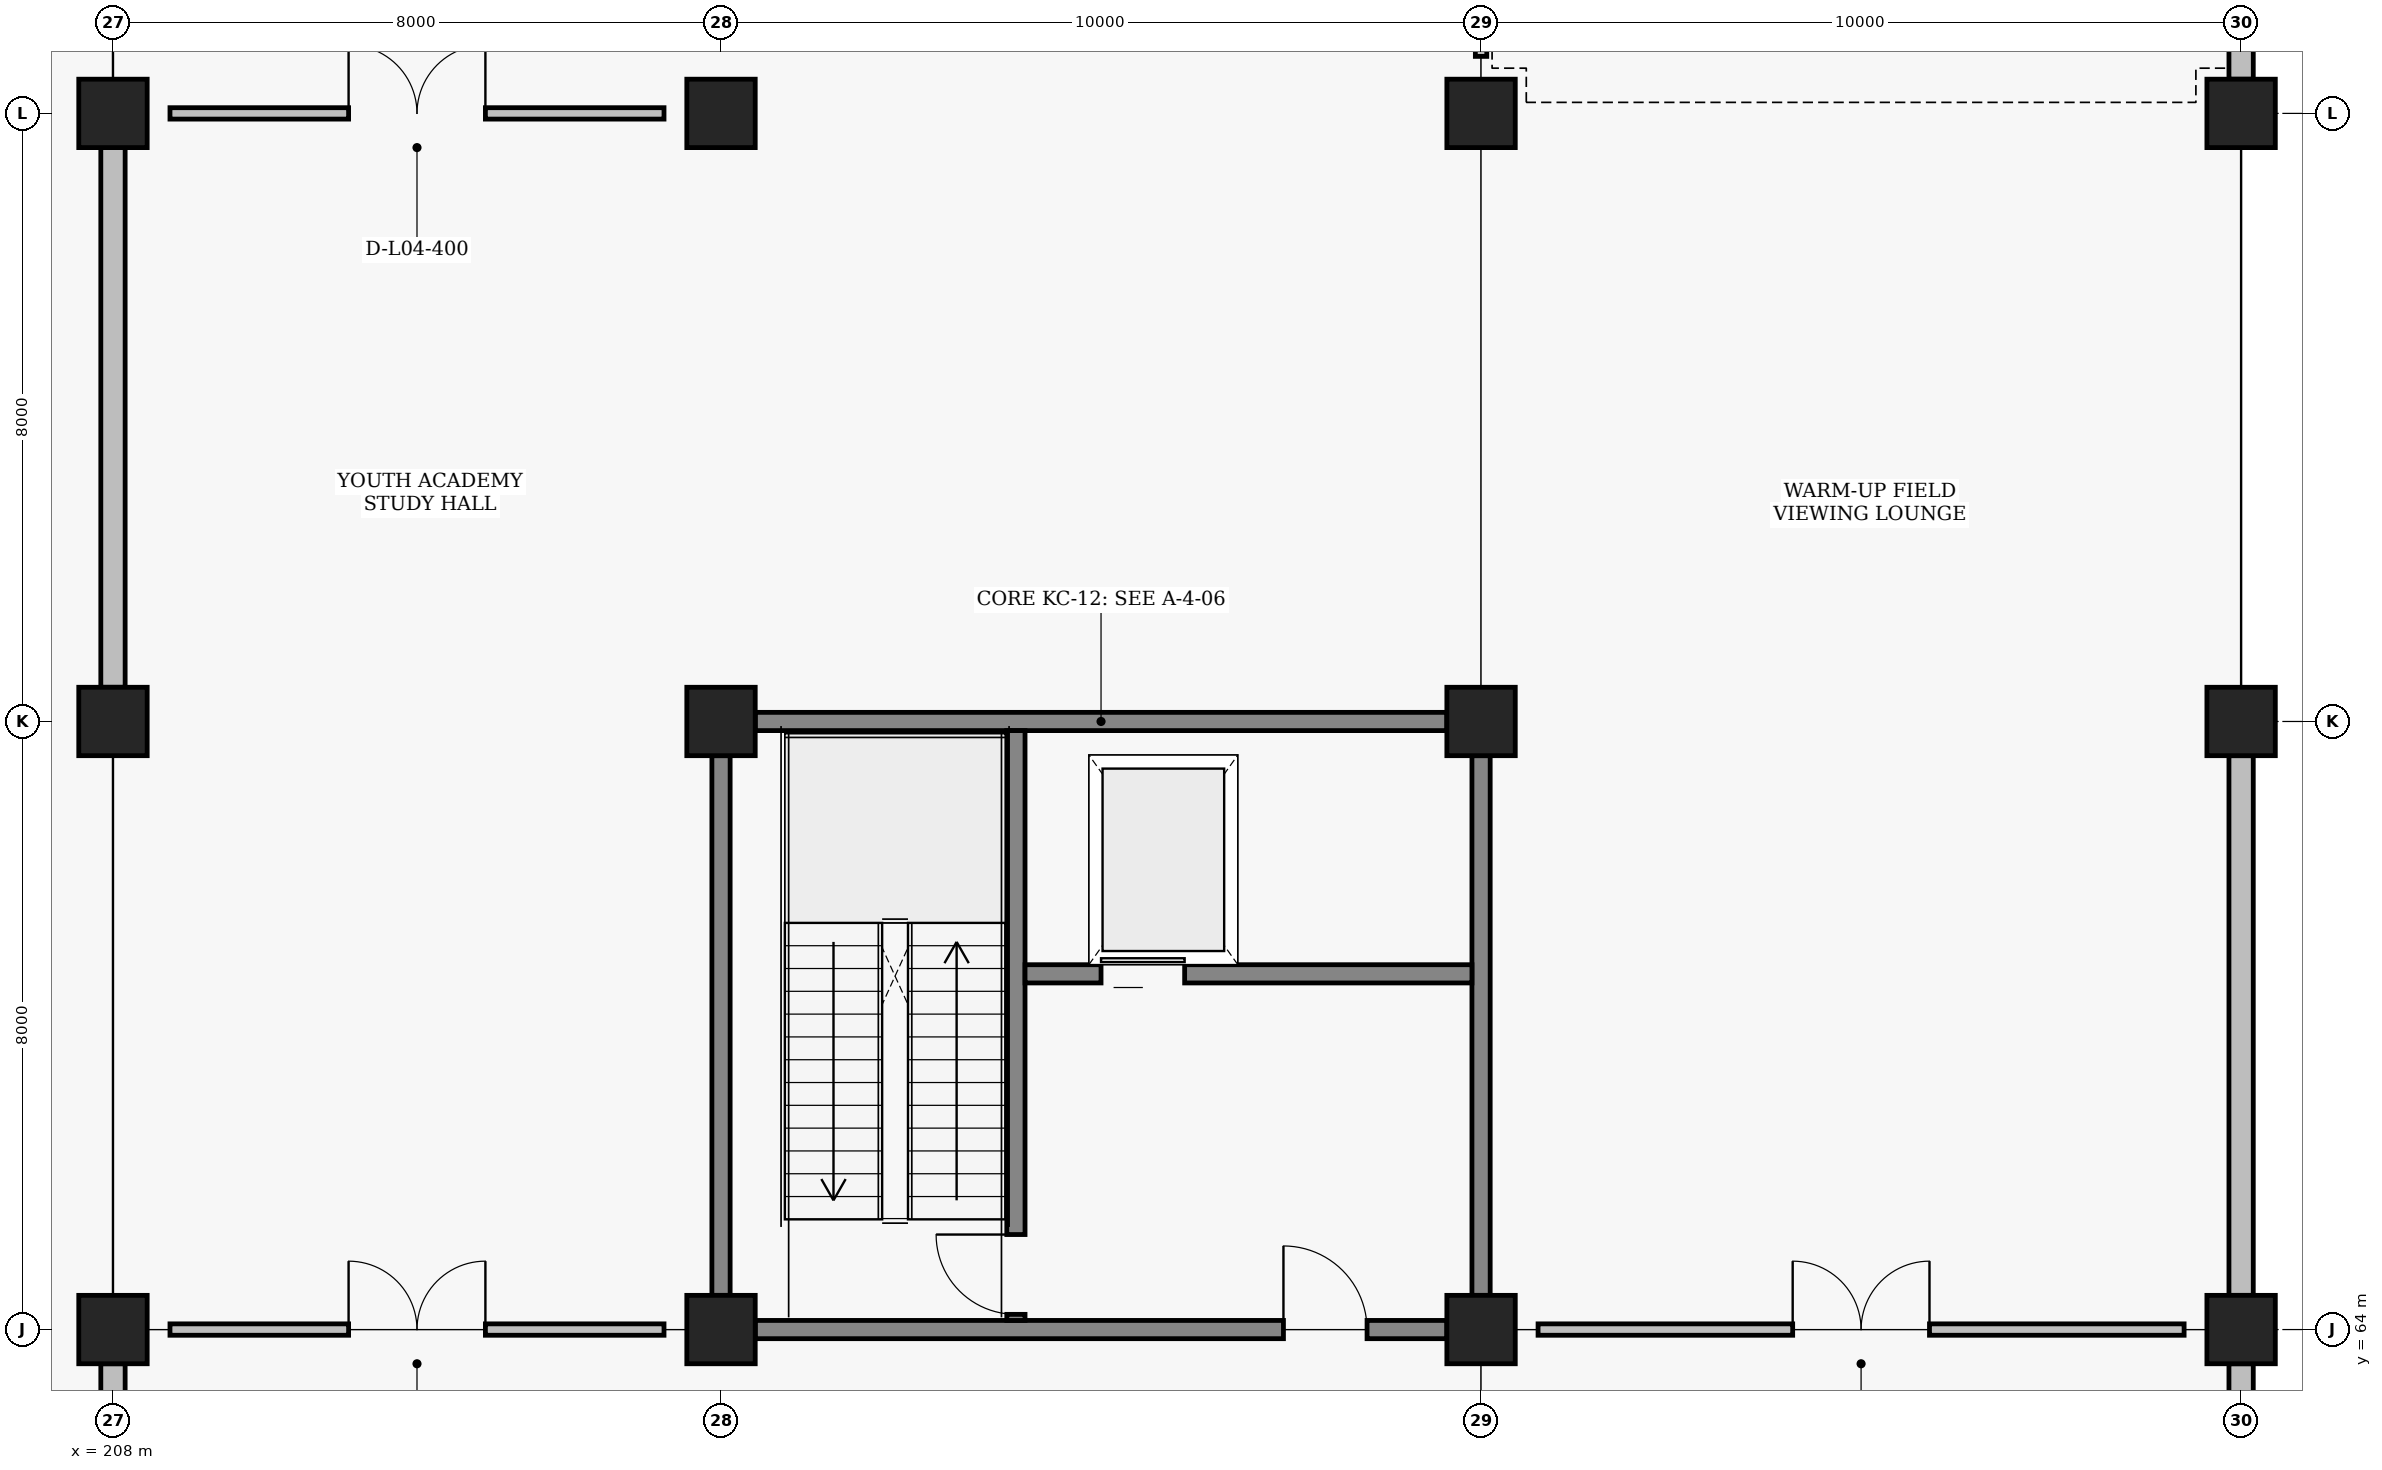
"""IFC4 building model, lengths in metres.
Left out: names, types, materials, properties, quantities, classifications, styles, units other than length and angle.
Written with IfcOpenShell. Run it as: python <this file> out.ifc"""

import sys

from ifc_helpers import new_model, si_unit, direction, frame, frame_2d, origin, origin_2d, place, context, subcontext, project, spatial, rectangle, extrude, element, fill, save


model = new_model("IFC4")
c1 = context("Model", 3, precision=1e-05, world=origin(), true_north=direction((0.0, 1.0)))
c2 = subcontext(c1, "Body", "Model", "MODEL_VIEW")
j1 = project(units=[si_unit("LENGTHUNIT", "METRE"), si_unit("PLANEANGLEUNIT", "RADIAN")], contexts=[c1])
p1 = place(None, origin())
s1 = spatial("IfcSite", under=j1, at=p1, CompositionType="ELEMENT")
p2 = place(p1, origin())
s2 = spatial("IfcBuilding", under=s1, at=p2, CompositionType="ELEMENT")
p3 = place(p2, frame((0.0, 0.0, 14.4)))
s3 = spatial("IfcBuildingStorey", under=s2, at=p3, CompositionType="ELEMENT", Elevation=14.4)
for number, where, z_axis, x_axis in (
    (1, (208.0, 64.0, 0.0), (0.0, 0.0, 1.0), (1.0, 0.0, 0.0)),
    (2, (208.0, 72.0, 0.0), (0.0, 0.0, 1.0), (1.0, 0.0, 0.0)),
    (3, (208.0, 80.0, 0.0), (0.0, 0.0, 1.0), (1.0, 0.0, 0.0)),
    (4, (216.0, 64.0, 0.0), (0.0, 0.0, 1.0), (1.0, 0.0, 0.0)),
    (5, (216.0, 72.0, 0.0), (0.0, 0.0, 1.0), (1.0, 0.0, 0.0)),
    (6, (216.0, 80.0, 0.0), (0.0, 0.0, 1.0), (1.0, 0.0, 0.0)),
    (7, (226.0, 64.0, 0.0), (0.0, 0.0, 1.0), (1.0, 0.0, 0.0)),
    (8, (226.0, 72.0, 0.0), (0.0, 0.0, 1.0), (1.0, 0.0, 0.0)),
    (9, (226.0, 80.0, 0.0), (0.0, 0.0, 1.0), (1.0, 0.0, 0.0)),
    (10, (236.0, 64.0, 0.0), (0.0, 0.0, 1.0), (1.0, 0.0, 0.0)),
    (11, (236.0, 72.0, 0.0), (0.0, 0.0, 1.0), (1.0, 0.0, 0.0)),
    (12, (236.0, 80.0, 0.0), (0.0, 0.0, 1.0), (1.0, 0.0, 0.0)),
):
    element("IfcColumn", number, at=place(p3, frame(where, z_axis=z_axis, x_axis=x_axis)), inside=s3, PredefinedType="COLUMN", context=c2, shape_type="SweptSolid", body=[
        extrude(rectangle(XDim=0.9, YDim=0.9, at=origin_2d()), origin(), (0.0, 0.0, 1.0), 4.2),
    ])
for number, where, z_axis, x_axis in (
    (13, (208.0, 56.45, 0.0), (0.0, 0.0, 1.0), (0.0, 1.0, 0.0)),
    (14, (208.0, 72.45, 0.0), (0.0, 0.0, 1.0), (0.0, 1.0, 0.0)),
):
    element("IfcWall", number, at=place(p3, frame(where, z_axis=z_axis, x_axis=x_axis)), inside=s3, PredefinedType="SOLIDWALL", context=c2, shape_type="SweptSolid", body=[
        extrude(rectangle(XDim=7.1, YDim=0.32, at=frame_2d((3.55, 0.0))), origin(), (0.0, 0.0, 1.0), 3.33),
    ])
for number, where, z_axis, x_axis in (
    (15, (236.0, 56.45, 0.0), (0.0, 0.0, 1.0), (0.0, 1.0, 0.0)),
    (16, (236.0, 64.45, 0.0), (0.0, 0.0, 1.0), (0.0, 1.0, 0.0)),
    (17, (236.0, 80.45, 0.0), (0.0, 0.0, 1.0), (0.0, 1.0, 0.0)),
):
    element("IfcWall", number, at=place(p3, frame(where, z_axis=z_axis, x_axis=x_axis)), inside=s3, PredefinedType="SOLIDWALL", context=c2, shape_type="SweptSolid", body=[
        extrude(rectangle(XDim=7.1, YDim=0.32, at=frame_2d((3.55, 0.0))), origin(), (0.0, 0.0, 1.0), 3.23),
    ])
p4 = place(p3, frame((216.45, 64.0, 0.0), z_axis=(0.0, 0.0, 1.0), x_axis=(1.0, 0.0, 0.0)))
e18 = element("IfcWall", 18, at=p4, inside=s3, PredefinedType="SHEAR", context=c2, shape_type="SweptSolid", body=[
    extrude(rectangle(XDim=9.1, YDim=0.24, at=frame_2d((4.55, 0.0))), origin(), (0.0, 0.0, 1.0), 3.23),
])
p5 = place(p4, frame((6.95, 0.0, 0.0)))
e19 = element("IfcOpeningElement", 19, at=p5, cuts=e18, PredefinedType="OPENING", context=c2, shape_type="SweptSolid", body=[
    extrude(rectangle(XDim=1.1, YDim=2.2, at=frame_2d((0.55, 1.1))), frame((0.0, 0.13, 0.0), z_axis=(0.0, -1.0, 0.0), x_axis=(1.0, 0.0, 0.0)), (0.0, 0.0, 1.0), 0.26),
])
p6 = place(p3, frame((216.45, 72.0, 0.0), z_axis=(0.0, 0.0, 1.0), x_axis=(1.0, 0.0, 0.0)))
e20 = element("IfcWall", 20, at=p6, inside=s3, PredefinedType="SHEAR", context=c2, shape_type="SweptSolid", body=[
    extrude(rectangle(XDim=9.1, YDim=0.24, at=frame_2d((4.55, 0.0))), origin(), (0.0, 0.0, 1.0), 3.23),
])
p7 = place(p3, frame((216.0, 64.45, 0.0), z_axis=(0.0, 0.0, 1.0), x_axis=(0.0, 1.0, 0.0)))
e21 = element("IfcWall", 21, at=p7, inside=s3, PredefinedType="SHEAR", context=c2, shape_type="SweptSolid", body=[
    extrude(rectangle(XDim=7.1, YDim=0.24, at=frame_2d((3.55, 0.0))), origin(), (0.0, 0.0, 1.0), 3.33),
])
p8 = place(p3, frame((226.0, 64.45, 0.0), z_axis=(0.0, 0.0, 1.0), x_axis=(0.0, 1.0, 0.0)))
e22 = element("IfcWall", 22, at=p8, inside=s3, PredefinedType="SHEAR", context=c2, shape_type="SweptSolid", body=[
    extrude(rectangle(XDim=7.1, YDim=0.24, at=frame_2d((3.55, 0.0))), origin(), (0.0, 0.0, 1.0), 3.23),
])
p9 = place(p3, frame((219.88, 64.12, 0.0), z_axis=(0.0, 0.0, 1.0), x_axis=(0.0, 1.0, 0.0)))
e23 = element("IfcWall", 23, at=p9, inside=s3, PredefinedType="SHEAR", context=c2, shape_type="SweptSolid", body=[
    extrude(rectangle(XDim=7.76, YDim=0.24, at=frame_2d((3.88, 0.0))), origin(), (0.0, 0.0, 1.0), 3.43),
])
p10 = place(p9, frame((0.08, 0.0, 0.0)))
e24 = element("IfcOpeningElement", 24, at=p10, cuts=e23, PredefinedType="OPENING", context=c2, shape_type="SweptSolid", body=[
    extrude(rectangle(XDim=1.05, YDim=2.15, at=frame_2d((0.525, 1.075))), frame((0.0, 0.13, 0.0), z_axis=(0.0, -1.0, 0.0), x_axis=(1.0, 0.0, 0.0)), (0.0, 0.0, 1.0), 0.26),
])
p11 = place(p3, frame((220.0, 68.68, 0.0), z_axis=(0.0, 0.0, 1.0), x_axis=(1.0, 0.0, 0.0)))
e25 = element("IfcWall", 25, at=p11, inside=s3, PredefinedType="SHEAR", context=c2, shape_type="SweptSolid", body=[
    extrude(rectangle(XDim=5.88, YDim=0.24, at=frame_2d((2.94, 0.0))), origin(), (0.0, 0.0, 1.0), 3.33),
])
p12 = place(p11, frame((1.0, 0.0, 0.0)))
e26 = element("IfcOpeningElement", 26, at=p12, cuts=e25, PredefinedType="OPENING", context=c2, shape_type="SweptSolid", body=[
    extrude(rectangle(XDim=1.1, YDim=2.15, at=frame_2d((0.55, 1.075))), frame((0.0, 0.13, 0.0), z_axis=(0.0, -1.0, 0.0), x_axis=(1.0, 0.0, 0.0)), (0.0, 0.0, 1.0), 0.26),
])
p13 = place(p3, frame((208.75, 64.0, 0.0), z_axis=(0.0, 0.0, 1.0), x_axis=(1.0, 0.0, 0.0)))
e27 = element("IfcWall", 27, at=p13, inside=s3, PredefinedType="PARTITIONING", context=c2, shape_type="SweptSolid", body=[
    extrude(rectangle(XDim=6.5, YDim=0.15, at=frame_2d((3.25, 0.0))), origin(), (0.0, 0.0, 1.0), 3.43),
])
p14 = place(p13, frame((2.35, 0.0, 0.0)))
e28 = element("IfcOpeningElement", 28, at=p14, cuts=e27, PredefinedType="OPENING", context=c2, shape_type="SweptSolid", body=[
    extrude(rectangle(XDim=1.8, YDim=2.3, at=frame_2d((0.9, 1.15))), frame((0.0, 0.085, 0.0), z_axis=(0.0, -1.0, 0.0), x_axis=(1.0, 0.0, 0.0)), (0.0, 0.0, 1.0), 0.17),
])
p15 = place(p3, frame((208.75, 80.0, 0.0), z_axis=(0.0, 0.0, 1.0), x_axis=(1.0, 0.0, 0.0)))
e29 = element("IfcWall", 29, at=p15, inside=s3, PredefinedType="PARTITIONING", context=c2, shape_type="SweptSolid", body=[
    extrude(rectangle(XDim=6.5, YDim=0.15, at=frame_2d((3.25, 0.0))), origin(), (0.0, 0.0, 1.0), 3.43),
])
p16 = place(p15, frame((2.35, 0.0, 0.0)))
e30 = element("IfcOpeningElement", 30, at=p16, cuts=e29, PredefinedType="OPENING", context=c2, shape_type="SweptSolid", body=[
    extrude(rectangle(XDim=1.8, YDim=2.3, at=frame_2d((0.9, 1.15))), frame((0.0, 0.085, 0.0), z_axis=(0.0, -1.0, 0.0), x_axis=(1.0, 0.0, 0.0)), (0.0, 0.0, 1.0), 0.17),
])
p17 = place(p3, frame((226.75, 64.0, 0.0), z_axis=(0.0, 0.0, 1.0), x_axis=(1.0, 0.0, 0.0)))
e31 = element("IfcWall", 31, at=p17, inside=s3, PredefinedType="PARTITIONING", context=c2, shape_type="SweptSolid", body=[
    extrude(rectangle(XDim=8.5, YDim=0.15, at=frame_2d((4.25, 0.0))), origin(), (0.0, 0.0, 1.0), 3.23),
])
p18 = place(p17, frame((3.35, 0.0, 0.0)))
e32 = element("IfcOpeningElement", 32, at=p18, cuts=e31, PredefinedType="OPENING", context=c2, shape_type="SweptSolid", body=[
    extrude(rectangle(XDim=1.8, YDim=2.3, at=frame_2d((0.9, 1.15))), frame((0.0, 0.085, 0.0), z_axis=(0.0, -1.0, 0.0), x_axis=(1.0, 0.0, 0.0)), (0.0, 0.0, 1.0), 0.17),
])
p19 = place(p3, frame((226.0, 80.75, 0.0), z_axis=(0.0, 0.0, 1.0), x_axis=(0.0, 1.0, 0.0)))
e33 = element("IfcWall", 33, at=p19, inside=s3, PredefinedType="PARTITIONING", context=c2, shape_type="SweptSolid", body=[
    extrude(rectangle(XDim=6.5, YDim=0.15, at=frame_2d((3.25, 0.0))), origin(), (0.0, 0.0, 1.0), 3.33),
])
p20 = place(p19, frame((2.725, 0.0, 0.0)))
e34 = element("IfcOpeningElement", 34, at=p20, cuts=e33, PredefinedType="OPENING", context=c2, shape_type="SweptSolid", body=[
    extrude(rectangle(XDim=1.05, YDim=2.15, at=frame_2d((0.525, 1.075))), frame((0.0, 0.085, 0.0), z_axis=(0.0, -1.0, 0.0), x_axis=(1.0, 0.0, 0.0)), (0.0, 0.0, 1.0), 0.17),
])
p21 = place(p5, origin())
e35 = element("IfcDoor", 35, at=p21, inside=s3, OperationType="SINGLE_SWING_LEFT", PredefinedType="DOOR", context=c2, shape_type="SweptSolid", body=[
    extrude(rectangle(XDim=1.1, YDim=2.2, at=frame_2d((0.55, 1.1))), frame((0.0, 0.025, 0.0), z_axis=(0.0, -1.0, 0.0), x_axis=(1.0, 0.0, 0.0)), (0.0, 0.0, 1.0), 0.05),
])
fill(e19, e35)
p22 = place(p10, origin())
e36 = element("IfcDoor", 36, at=p22, inside=s3, OperationType="SINGLE_SWING_RIGHT", PredefinedType="DOOR", context=c2, shape_type="SweptSolid", body=[
    extrude(rectangle(XDim=1.05, YDim=2.15, at=frame_2d((0.525, 1.075))), frame((0.0, 0.025, 0.0), z_axis=(0.0, -1.0, 0.0), x_axis=(1.0, 0.0, 0.0)), (0.0, 0.0, 1.0), 0.05),
])
fill(e24, e36)
p23 = place(p12, origin())
e37 = element("IfcDoor", 37, at=p23, inside=s3, OperationType="SLIDING_TO_LEFT", PredefinedType="DOOR", context=c2, shape_type="SweptSolid", body=[
    extrude(rectangle(XDim=1.1, YDim=2.15, at=frame_2d((0.55, 1.075))), frame((0.0, 0.025, 0.0), z_axis=(0.0, -1.0, 0.0), x_axis=(1.0, 0.0, 0.0)), (0.0, 0.0, 1.0), 0.05),
])
fill(e26, e37)
p24 = place(p14, origin())
e38 = element("IfcDoor", 38, at=p24, inside=s3, OperationType="DOUBLE_SWING_LEFT", PredefinedType="DOOR", context=c2, shape_type="SweptSolid", body=[
    extrude(rectangle(XDim=1.8, YDim=2.3, at=frame_2d((0.9, 1.15))), frame((0.0, 0.025, 0.0), z_axis=(0.0, -1.0, 0.0), x_axis=(1.0, 0.0, 0.0)), (0.0, 0.0, 1.0), 0.05),
])
fill(e28, e38)
p25 = place(p16, origin())
e39 = element("IfcDoor", 39, at=p25, inside=s3, OperationType="DOUBLE_SWING_LEFT", PredefinedType="DOOR", context=c2, shape_type="SweptSolid", body=[
    extrude(rectangle(XDim=1.8, YDim=2.3, at=frame_2d((0.9, 1.15))), frame((0.0, 0.025, 0.0), z_axis=(0.0, -1.0, 0.0), x_axis=(1.0, 0.0, 0.0)), (0.0, 0.0, 1.0), 0.05),
])
fill(e30, e39)
p26 = place(p18, origin())
e40 = element("IfcDoor", 40, at=p26, inside=s3, OperationType="DOUBLE_SWING_LEFT", PredefinedType="DOOR", context=c2, shape_type="SweptSolid", body=[
    extrude(rectangle(XDim=1.8, YDim=2.3, at=frame_2d((0.9, 1.15))), frame((0.0, 0.025, 0.0), z_axis=(0.0, -1.0, 0.0), x_axis=(1.0, 0.0, 0.0)), (0.0, 0.0, 1.0), 0.05),
])
fill(e32, e40)
save(model, sys.argv[1])
